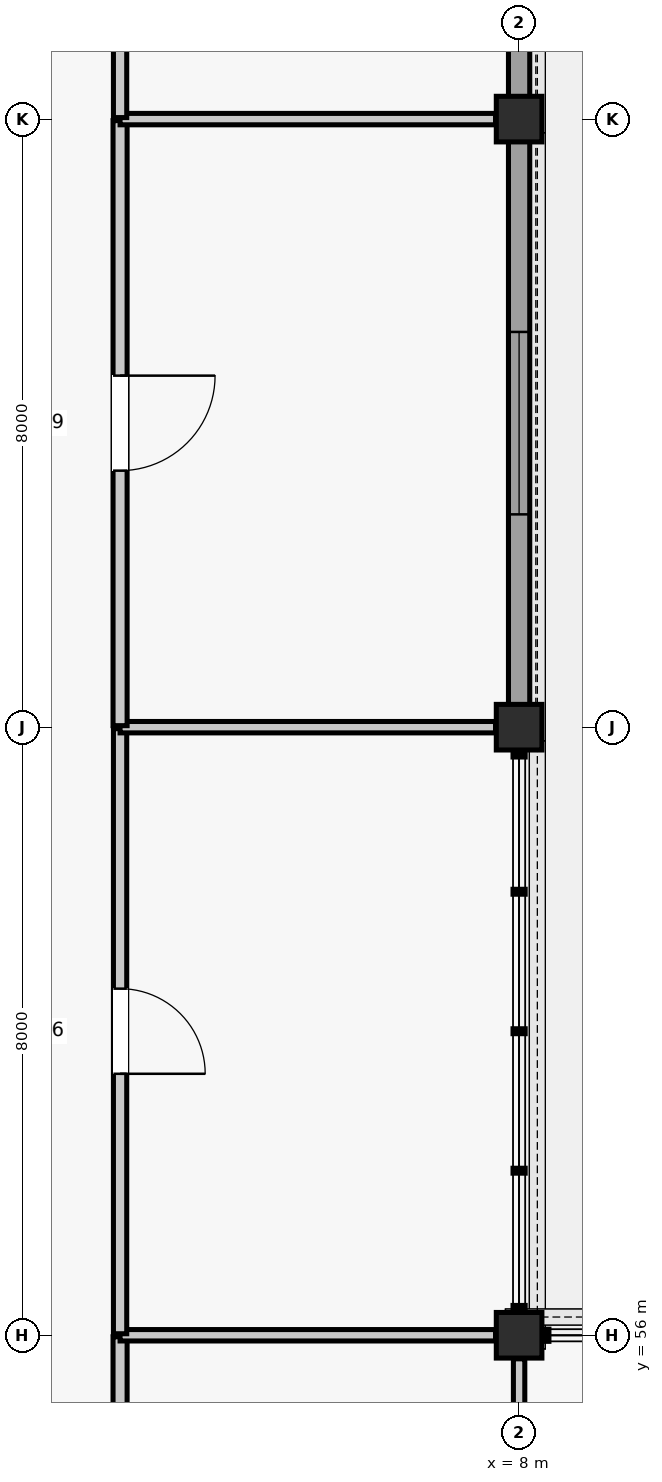
"""IFC4 building model, lengths in metres.
Left out: names, types, materials, properties, quantities, classifications, styles, units other than length and angle.
Written with IfcOpenShell. Run it as: python <this file> out.ifc"""

import sys

from ifc_helpers import new_model, si_unit, direction, frame, frame_2d, origin, origin_2d, place, context, subcontext, project, spatial, rectangle, extrude, element, fill, save


model = new_model("IFC4")
c1 = context("Model", 3, precision=1e-05, world=origin(), true_north=direction((0.0, 1.0)))
c2 = subcontext(c1, "Body", "Model", "MODEL_VIEW")
j1 = project(units=[si_unit("LENGTHUNIT", "METRE"), si_unit("PLANEANGLEUNIT", "RADIAN")], contexts=[c1])
p1 = place(None, origin())
s1 = spatial("IfcSite", under=j1, at=p1, CompositionType="ELEMENT")
p2 = place(p1, origin())
s2 = spatial("IfcBuilding", under=s1, at=p2, CompositionType="ELEMENT")
p3 = place(p2, frame((0.0, 0.0, 5.28)))
s3 = spatial("IfcBuildingStorey", under=s2, at=p3, CompositionType="ELEMENT", Elevation=5.28)
for number, where, z_axis, x_axis in (
    (1, (8.0, 56.0, 0.0), (0.0, 0.0, 1.0), (1.0, 0.0, 0.0)),
    (2, (8.0, 64.0, 0.0), (0.0, 0.0, 1.0), (1.0, 0.0, 0.0)),
    (3, (8.0, 72.0, 0.0), (0.0, 0.0, 1.0), (1.0, 0.0, 0.0)),
):
    element("IfcColumn", number, at=place(p3, frame(where, z_axis=z_axis, x_axis=x_axis)), inside=s3, PredefinedType="COLUMN", context=c2, shape_type="SweptSolid", body=[
        extrude(rectangle(XDim=0.6, YDim=0.6, at=origin_2d()), origin(), (0.0, 0.0, 1.0), 4.62),
    ])
p4 = place(p3, frame((8.0, 64.285, 0.0), z_axis=(0.0, 0.0, 1.0), x_axis=(0.0, 1.0, 0.0)))
e4 = element("IfcWall", 4, at=p4, inside=s3, PredefinedType="SOLIDWALL", context=c2, shape_type="SweptSolid", body=[
    extrude(rectangle(XDim=7.43, YDim=0.28, at=frame_2d((3.715, 0.0))), origin(), (0.0, 0.0, 1.0), 3.914),
])
p5 = place(p4, frame((2.515, 0.0, 0.9)))
e5 = element("IfcOpeningElement", 5, at=p5, cuts=e4, PredefinedType="OPENING", context=c2, shape_type="SweptSolid", body=[
    extrude(rectangle(XDim=2.4, YDim=2.4, at=frame_2d((1.2, 1.2))), frame((0.0, 0.15, 0.0), z_axis=(0.0, -1.0, 0.0), x_axis=(1.0, 0.0, 0.0)), (0.0, 0.0, 1.0), 0.3),
])
p6 = place(p3, frame((8.0, 72.285, 0.0), z_axis=(0.0, 0.0, 1.0), x_axis=(0.0, 1.0, 0.0)))
e6 = element("IfcWall", 6, at=p6, inside=s3, PredefinedType="SOLIDWALL", context=c2, shape_type="SweptSolid", body=[
    extrude(rectangle(XDim=7.355, YDim=0.28, at=frame_2d((3.677, 0.0))), origin(), (0.0, 0.0, 1.0), 3.977),
])
p7 = place(p6, frame((2.627, 0.0, 0.9)))
e7 = element("IfcOpeningElement", 7, at=p7, cuts=e6, PredefinedType="OPENING", context=c2, shape_type="SweptSolid", body=[
    extrude(rectangle(XDim=2.1, YDim=2.4, at=frame_2d((1.05, 1.2))), frame((0.0, 0.15, 0.0), z_axis=(0.0, -1.0, 0.0), x_axis=(1.0, 0.0, 0.0)), (0.0, 0.0, 1.0), 0.3),
])
p8 = place(p3, frame((2.75, 50.7, 0.0), z_axis=(0.0, 0.0, 1.0), x_axis=(0.0, 1.0, 0.0)))
e8 = element("IfcWall", 8, at=p8, inside=s3, PredefinedType="PARTITIONING", context=c2, shape_type="SweptSolid", body=[
    extrude(rectangle(XDim=5.28, YDim=0.185, at=frame_2d((2.64, 0.0))), origin(), (0.0, 0.0, 1.0), 3.781),
])
p9 = place(p3, frame((2.75, 56.0, 0.0), z_axis=(0.0, 0.0, 1.0), x_axis=(1.0, 0.0, 0.0)))
e9 = element("IfcWall", 9, at=p9, inside=s3, PredefinedType="PARTITIONING", context=c2, shape_type="SweptSolid", body=[
    extrude(rectangle(XDim=4.94, YDim=0.15, at=frame_2d((2.47, 0.0))), origin(), (0.0, 0.0, 1.0), 3.781),
])
p10 = place(p3, frame((8.0, 50.75, 0.0), z_axis=(0.0, 0.0, 1.0), x_axis=(0.0, 1.0, 0.0)))
e10 = element("IfcWall", 10, at=p10, inside=s3, PredefinedType="PARTITIONING", context=c2, shape_type="SweptSolid", body=[
    extrude(rectangle(XDim=4.94, YDim=0.15, at=frame_2d((2.47, 0.0))), origin(), (0.0, 0.0, 1.0), 3.851),
])
p11 = place(p3, frame((2.75, 56.02, 0.0), z_axis=(0.0, 0.0, 1.0), x_axis=(0.0, 1.0, 0.0)))
e11 = element("IfcWall", 11, at=p11, inside=s3, PredefinedType="PARTITIONING", context=c2, shape_type="SweptSolid", body=[
    extrude(rectangle(XDim=7.96, YDim=0.175, at=frame_2d((3.98, 0.0))), origin(), (0.0, 0.0, 1.0), 3.712),
])
p12 = place(p11, frame((3.42, 0.0, 0.0)))
e12 = element("IfcOpeningElement", 12, at=p12, cuts=e11, PredefinedType="OPENING", context=c2, shape_type="SweptSolid", body=[
    extrude(rectangle(XDim=1.12, YDim=2.22, at=frame_2d((0.56, 1.11))), frame((0.0, 0.097, 0.0), z_axis=(0.0, -1.0, 0.0), x_axis=(1.0, 0.0, 0.0)), (0.0, 0.0, 1.0), 0.195),
])
p13 = place(p3, frame((2.75, 64.0, 0.0), z_axis=(0.0, 0.0, 1.0), x_axis=(1.0, 0.0, 0.0)))
e13 = element("IfcWall", 13, at=p13, inside=s3, PredefinedType="PARTITIONING", context=c2, shape_type="SweptSolid", body=[
    extrude(rectangle(XDim=4.94, YDim=0.15, at=frame_2d((2.47, 0.0))), origin(), (0.0, 0.0, 1.0), 3.712),
])
p14 = place(p3, frame((2.75, 64.02, 0.0), z_axis=(0.0, 0.0, 1.0), x_axis=(0.0, 1.0, 0.0)))
e14 = element("IfcWall", 14, at=p14, inside=s3, PredefinedType="PARTITIONING", context=c2, shape_type="SweptSolid", body=[
    extrude(rectangle(XDim=7.96, YDim=0.185, at=frame_2d((3.98, 0.0))), origin(), (0.0, 0.0, 1.0), 3.712),
])
p15 = place(p14, frame((3.355, 0.0, 0.0)))
e15 = element("IfcOpeningElement", 15, at=p15, cuts=e14, PredefinedType="OPENING", context=c2, shape_type="SweptSolid", body=[
    extrude(rectangle(XDim=1.25, YDim=2.18, at=frame_2d((0.625, 1.09))), frame((0.0, 0.103, 0.0), z_axis=(0.0, -1.0, 0.0), x_axis=(1.0, 0.0, 0.0)), (0.0, 0.0, 1.0), 0.205),
])
p16 = place(p3, frame((2.75, 72.0, 0.0), z_axis=(0.0, 0.0, 1.0), x_axis=(1.0, 0.0, 0.0)))
e16 = element("IfcWall", 16, at=p16, inside=s3, PredefinedType="PARTITIONING", context=c2, shape_type="SweptSolid", body=[
    extrude(rectangle(XDim=4.94, YDim=0.15, at=frame_2d((2.47, 0.0))), origin(), (0.0, 0.0, 1.0), 3.787),
])
p17 = place(p3, frame((2.75, 72.02, 0.0), z_axis=(0.0, 0.0, 1.0), x_axis=(0.0, 1.0, 0.0)))
e17 = element("IfcWall", 17, at=p17, inside=s3, PredefinedType="PARTITIONING", context=c2, shape_type="SweptSolid", body=[
    extrude(rectangle(XDim=7.96, YDim=0.175, at=frame_2d((3.98, 0.0))), origin(), (0.0, 0.0, 1.0), 3.771),
])
p18 = place(p17, frame((3.51, 0.0, 0.0)))
e18 = element("IfcOpeningElement", 18, at=p18, cuts=e17, PredefinedType="OPENING", context=c2, shape_type="SweptSolid", body=[
    extrude(rectangle(XDim=0.94, YDim=2.12, at=frame_2d((0.47, 1.06))), frame((0.0, 0.097, 0.0), z_axis=(0.0, -1.0, 0.0), x_axis=(1.0, 0.0, 0.0)), (0.0, 0.0, 1.0), 0.195),
])
p19 = place(p5, origin())
e19 = element("IfcWindow", 19, at=p19, inside=s3, PartitioningType="SINGLE_PANEL", PredefinedType="WINDOW", context=c2, shape_type="SweptSolid", body=[
    extrude(rectangle(XDim=2.4, YDim=2.4, at=frame_2d((1.2, 1.2))), frame((0.0, 0.03, 0.0), z_axis=(0.0, -1.0, 0.0), x_axis=(1.0, 0.0, 0.0)), (0.0, 0.0, 1.0), 0.06),
])
fill(e5, e19)
p20 = place(p12, frame((1.12, 0.0, 0.0), z_axis=(0.0, 0.0, 1.0), x_axis=(-1.0, 0.0, 0.0)))
e20 = element("IfcDoor", 20, at=p20, inside=s3, OperationType="SINGLE_SWING_LEFT", PredefinedType="DOOR", context=c2, shape_type="SweptSolid", body=[
    extrude(rectangle(XDim=1.12, YDim=2.22, at=frame_2d((0.56, 1.11))), frame((0.0, 0.025, 0.0), z_axis=(0.0, -1.0, 0.0), x_axis=(1.0, 0.0, 0.0)), (0.0, 0.0, 1.0), 0.05),
])
fill(e12, e20)
p21 = place(p15, frame((1.25, 0.0, 0.0), z_axis=(0.0, 0.0, 1.0), x_axis=(-1.0, 0.0, 0.0)))
e21 = element("IfcDoor", 21, at=p21, inside=s3, OperationType="SINGLE_SWING_RIGHT", PredefinedType="DOOR", context=c2, shape_type="SweptSolid", body=[
    extrude(rectangle(XDim=1.25, YDim=2.18, at=frame_2d((0.625, 1.09))), frame((0.0, 0.025, 0.0), z_axis=(0.0, -1.0, 0.0), x_axis=(1.0, 0.0, 0.0)), (0.0, 0.0, 1.0), 0.05),
])
fill(e15, e21)
save(model, sys.argv[1])
